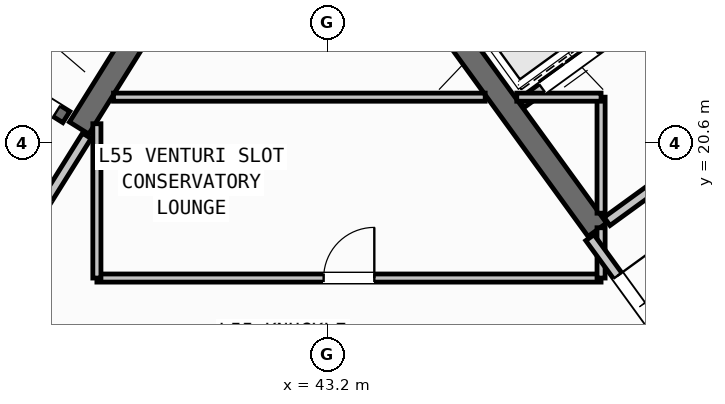
"""IFC4 building model, lengths in metres.
Left out: names, types, materials, properties, quantities, classifications, styles, units other than length and angle.
Written with IfcOpenShell. Run it as: python <this file> out.ifc"""

import sys

from ifc_helpers import new_model, si_unit, direction, frame, frame_2d, origin, place, context, subcontext, project, spatial, rectangle, extrude, source, transform, mapped, element, fill, save


model = new_model("IFC4")
c1 = context("Model", 3, precision=1e-05, world=origin(), true_north=direction((0.0, 1.0)))
c2 = subcontext(c1, "Body", "Model", "MODEL_VIEW")
j1 = project(units=[si_unit("LENGTHUNIT", "METRE"), si_unit("PLANEANGLEUNIT", "RADIAN")], contexts=[c1])
p1 = place(None, origin())
s1 = spatial("IfcSite", under=j1, at=p1, CompositionType="ELEMENT")
p2 = place(p1, origin())
s2 = spatial("IfcBuilding", under=s1, at=p2, CompositionType="ELEMENT")
p3 = place(p2, frame((0.0, 0.0, 218.4)))
s3 = spatial("IfcBuildingStorey", under=s2, at=p3, CompositionType="ELEMENT", Elevation=218.4)
p4 = place(p3, frame((40.221, 23.965, 0.0), z_axis=(0.0, 0.0, 1.0), x_axis=(-0.529902075036, -0.848058836916, 0.0)))
e1 = element("IfcWall", 1, at=p4, inside=s3, PredefinedType="SHEAR", context=c2, shape_type="SweptSolid", body=[
    extrude(rectangle(XDim=3.625, YDim=0.45, at=frame_2d((1.812, 0.0))), origin(), (0.0, 0.0, 1.0), 3.35),
])
p5 = place(p3, frame((48.526, 18.884, 0.0), z_axis=(0.0, 0.0, 1.0), x_axis=(-0.587774812919, 0.809024578921, 0.0)))
e2 = element("IfcWall", 2, at=p5, inside=s3, PredefinedType="SHEAR", context=c2, shape_type="SweptSolid", body=[
    extrude(rectangle(XDim=6.475, YDim=0.45, at=frame_2d((3.238, 0.0))), origin(), (0.0, 0.0, 1.0), 3.35),
])
p6 = place(p3, frame((38.046, 21.108, 0.0), z_axis=(0.0, 0.0, 1.0), x_axis=(-0.848054434086, 0.529909121291, 0.0)))
e3 = element("IfcWall", 3, at=p6, inside=s3, PredefinedType="SHEAR", context=c2, shape_type="SweptSolid", body=[
    extrude(rectangle(XDim=7.33, YDim=0.26, at=frame_2d((3.665, 0.0))), origin(), (0.0, 0.0, 1.0), 3.35),
])
p7 = place(p6, frame((0.22, 0.0, 0.0)))
e4 = element("IfcOpeningElement", 4, at=p7, cuts=e3, PredefinedType="OPENING", context=c2, shape_type="SweptSolid", body=[
    extrude(rectangle(XDim=1.1, YDim=2.1, at=frame_2d((0.55, 1.05))), frame((0.0, 0.14, 0.0), z_axis=(0.0, -1.0, 0.0), x_axis=(1.0, 0.0, 0.0)), (0.0, 0.0, 1.0), 0.28),
])
p8 = place(p3, frame((47.025, 21.378, 0.0), z_axis=(0.0, 0.0, 1.0), x_axis=(0.809052869724, 0.587735870941, 0.0)))
e5 = element("IfcWall", 5, at=p8, inside=s3, PredefinedType="STANDARD", context=c2, shape_type="SweptSolid", body=[
    extrude(rectangle(XDim=3.498, YDim=0.2, at=frame_2d((1.749, 0.0))), origin(), (0.0, 0.0, 1.0), 3.34),
])
p9 = place(p8, frame((0.508, 0.0, 0.0)))
e6 = element("IfcOpeningElement", 6, at=p9, cuts=e5, PredefinedType="OPENING", context=c2, shape_type="SweptSolid", body=[
    extrude(rectangle(XDim=1.3, YDim=2.2, at=frame_2d((0.65, 1.1))), frame((0.0, 0.11, 0.0), z_axis=(0.0, -1.0, 0.0), x_axis=(1.0, 0.0, 0.0)), (0.0, 0.0, 1.0), 0.22),
])
p10 = place(p3, frame((48.718, 19.048, 0.0), z_axis=(0.0, 0.0, 1.0), x_axis=(0.809017261719, 0.587784884325, 0.0)))
e7 = element("IfcWall", 7, at=p10, inside=s3, PredefinedType="STANDARD", context=c2, shape_type="SweptSolid", body=[
    extrude(rectangle(XDim=5.818, YDim=0.2, at=frame_2d((2.909, 0.0))), origin(), (0.0, 0.0, 1.0), 3.34),
])
p11 = place(p10, frame((2.598, 0.0, 0.0)))
e8 = element("IfcOpeningElement", 8, at=p11, cuts=e7, PredefinedType="OPENING", context=c2, shape_type="SweptSolid", body=[
    extrude(rectangle(XDim=1.15, YDim=2.1, at=frame_2d((0.575, 1.05))), frame((0.0, 0.11, 0.0), z_axis=(0.0, -1.0, 0.0), x_axis=(1.0, 0.0, 0.0)), (0.0, 0.0, 1.0), 0.22),
])
p12 = place(p3, frame((38.451, 20.737, 0.0), z_axis=(0.0, 0.0, 1.0), x_axis=(-0.529924799939, -0.848044637038, 0.0)))
e9 = element("IfcWall", 9, at=p12, inside=s3, PredefinedType="STANDARD", context=c2, shape_type="SweptSolid", body=[
    extrude(rectangle(XDim=2.96, YDim=0.2, at=frame_2d((1.48, 0.0))), origin(), (0.0, 0.0, 1.0), 3.34),
])
p13 = place(p12, frame((1.46, 0.0, 0.0)))
e10 = element("IfcOpeningElement", 10, at=p13, cuts=e9, PredefinedType="OPENING", context=c2, shape_type="SweptSolid", body=[
    extrude(rectangle(XDim=0.86, YDim=2.05, at=frame_2d((0.43, 1.025))), frame((0.0, 0.11, 0.0), z_axis=(0.0, -1.0, 0.0), x_axis=(1.0, 0.0, 0.0)), (0.0, 0.0, 1.0), 0.22),
])
p14 = place(p3, frame((38.65, 17.93, 0.0), z_axis=(0.0, 0.0, 1.0), x_axis=(1.0, 0.0, 0.0)))
e11 = element("IfcWall", 11, at=p14, inside=s3, PredefinedType="PARTITIONING", context=c2, shape_type="SweptSolid", body=[
    extrude(rectangle(XDim=9.95, YDim=0.16, at=frame_2d((4.975, 0.0))), origin(), (0.0, 0.0, 1.0), 3.34),
])
p15 = place(p14, frame((4.475, 0.0, 0.0)))
e12 = element("IfcOpeningElement", 12, at=p15, cuts=e11, PredefinedType="OPENING", context=c2, shape_type="SweptSolid", body=[
    extrude(rectangle(XDim=1.0, YDim=2.1, at=frame_2d((0.5, 1.05))), frame((0.0, 0.09, 0.0), z_axis=(0.0, -1.0, 0.0), x_axis=(1.0, 0.0, 0.0)), (0.0, 0.0, 1.0), 0.18),
])
p16 = place(p3, frame((38.65, 17.93, 0.0), z_axis=(0.0, 0.0, 1.0), x_axis=(0.0, 1.0, 0.0)))
e13 = element("IfcWall", 13, at=p16, inside=s3, PredefinedType="PARTITIONING", context=c2, shape_type="SweptSolid", body=[
    extrude(rectangle(XDim=3.046, YDim=0.16, at=frame_2d((1.523, 0.0))), origin(), (0.0, 0.0, 1.0), 3.34),
])
p17 = place(p3, frame((48.6, 17.93, 0.0), z_axis=(0.0, 0.0, 1.0), x_axis=(0.0, 1.0, 0.0)))
e14 = element("IfcWall", 14, at=p17, inside=s3, PredefinedType="PARTITIONING", context=c2, shape_type="SweptSolid", body=[
    extrude(rectangle(XDim=0.993, YDim=0.16, at=frame_2d((0.496, 0.0))), origin(), (0.0, 0.0, 1.0), 3.34),
])
p18 = place(p3, frame((48.6, 19.21, 0.0), z_axis=(0.0, 0.0, 1.0), x_axis=(0.0, 1.0, 0.0)))
e15 = element("IfcWall", 15, at=p18, inside=s3, PredefinedType="PARTITIONING", context=c2, shape_type="SweptSolid", body=[
    extrude(rectangle(XDim=2.29, YDim=0.16, at=frame_2d((1.145, 0.0))), origin(), (0.0, 0.0, 1.0), 3.34),
])
p19 = place(p3, frame((38.978, 21.5, 0.0), z_axis=(0.0, 0.0, 1.0), x_axis=(1.0, 0.0, 0.0)))
e16 = element("IfcWall", 16, at=p19, inside=s3, PredefinedType="PARTITIONING", context=c2, shape_type="SweptSolid", body=[
    extrude(rectangle(XDim=7.336, YDim=0.16, at=frame_2d((3.668, 0.0))), origin(), (0.0, 0.0, 1.0), 3.34),
])
p20 = place(p3, frame((46.936, 21.5, 0.0), z_axis=(0.0, 0.0, 1.0), x_axis=(1.0, 0.0, 0.0)))
e17 = element("IfcWall", 17, at=p20, inside=s3, PredefinedType="PARTITIONING", context=c2, shape_type="SweptSolid", body=[
    extrude(rectangle(XDim=1.664, YDim=0.16, at=frame_2d((0.832, 0.0))), origin(), (0.0, 0.0, 1.0), 3.34),
])
p21 = place(p3, frame((50.119, 16.333, 0.0), z_axis=(0.0, 0.0, 1.0), x_axis=(-0.587749856981, 0.809042709391, 0.0)))
e18 = element("IfcWall", 18, at=p21, inside=s3, PredefinedType="STANDARD", context=c2, shape_type="SweptSolid", body=[
    extrude(rectangle(XDim=2.96, YDim=0.2, at=frame_2d((1.48, 0.0))), origin(), (0.0, 0.0, 1.0), 3.34),
])
p22 = place(p21, frame((0.53, 0.0, 0.0)))
e19 = element("IfcOpeningElement", 19, at=p22, cuts=e18, PredefinedType="OPENING", context=c2, shape_type="SweptSolid", body=[
    extrude(rectangle(XDim=1.5, YDim=2.15, at=frame_2d((0.75, 1.075))), frame((0.0, 0.11, 0.0), z_axis=(0.0, -1.0, 0.0), x_axis=(1.0, 0.0, 0.0)), (0.0, 0.0, 1.0), 0.22),
])
m1 = source(origin(), c2, "Body", "SweptSolid", [
    extrude(rectangle(XDim=1.1, YDim=2.1, at=frame_2d((0.55, 1.05))), frame((0.0, 0.025, 0.0), z_axis=(0.0, -1.0, 0.0), x_axis=(1.0, 0.0, 0.0)), (0.0, 0.0, 1.0), 0.05),
])
p23 = place(p7, origin())
e20 = element("IfcDoor", 20, at=p23, inside=s3, OperationType="SINGLE_SWING_RIGHT", PredefinedType="DOOR", context=c2, shape_type="MappedRepresentation", body=[
    mapped(m1, transform((0.0, 0.0, 0.0), scale=1.0)),
])
fill(e4, e20)
m2 = source(origin(), c2, "Body", "SweptSolid", [
    extrude(rectangle(XDim=1.3, YDim=2.2, at=frame_2d((0.65, 1.1))), frame((0.0, 0.025, 0.0), z_axis=(0.0, -1.0, 0.0), x_axis=(1.0, 0.0, 0.0)), (0.0, 0.0, 1.0), 0.05),
])
p24 = place(p9, origin())
e21 = element("IfcDoor", 21, at=p24, inside=s3, OperationType="DOUBLE_DOOR_SLIDING", PredefinedType="DOOR", context=c2, shape_type="MappedRepresentation", body=[
    mapped(m2, transform((0.0, 0.0, 0.0), scale=1.0)),
])
fill(e6, e21)
m3 = source(origin(), c2, "Body", "SweptSolid", [
    extrude(rectangle(XDim=1.0, YDim=2.1, at=frame_2d((0.5, 1.05))), frame((0.0, 0.025, 0.0), z_axis=(0.0, -1.0, 0.0), x_axis=(1.0, 0.0, 0.0)), (0.0, 0.0, 1.0), 0.05),
])
p25 = place(p15, origin())
e22 = element("IfcDoor", 22, at=p25, inside=s3, OperationType="SINGLE_SWING_RIGHT", PredefinedType="DOOR", context=c2, shape_type="MappedRepresentation", body=[
    mapped(m3, transform((0.0, 0.0, 0.0), scale=1.0)),
])
fill(e12, e22)
m4 = source(origin(), c2, "Body", "SweptSolid", [
    extrude(rectangle(XDim=1.5, YDim=2.15, at=frame_2d((0.75, 1.075))), frame((0.0, 0.025, 0.0), z_axis=(0.0, -1.0, 0.0), x_axis=(1.0, 0.0, 0.0)), (0.0, 0.0, 1.0), 0.05),
])
p26 = place(p22, frame((1.5, 0.0, 0.0), z_axis=(0.0, 0.0, 1.0), x_axis=(-1.0, 0.0, 0.0)))
e23 = element("IfcDoor", 23, at=p26, inside=s3, OperationType="DOUBLE_DOOR_SINGLE_SWING", PredefinedType="DOOR", context=c2, shape_type="MappedRepresentation", body=[
    mapped(m4, transform((0.0, 0.0, 0.0), scale=1.0)),
])
fill(e19, e23)
save(model, sys.argv[1])
